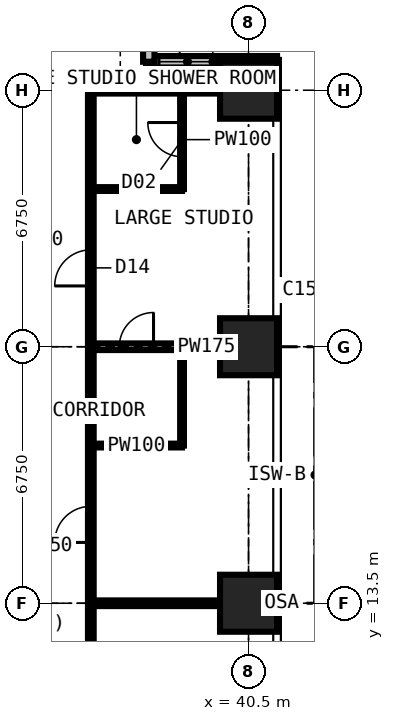
"""IFC4 building model, lengths in metres.
Left out: names, types, materials, properties, quantities, classifications, styles, units other than length and angle.
Written with IfcOpenShell. Run it as: python <this file> out.ifc"""

import sys

from ifc_helpers import new_model, si_unit, direction, frame, frame_2d, origin, origin_2d, place, context, subcontext, project, spatial, rectangle, extrude, element, fill, save


model = new_model("IFC4")
c1 = context("Model", 3, precision=1e-05, world=origin(), true_north=direction((0.0, 1.0)))
c2 = subcontext(c1, "Body", "Model", "MODEL_VIEW")
j1 = project(units=[si_unit("LENGTHUNIT", "METRE"), si_unit("PLANEANGLEUNIT", "RADIAN")], contexts=[c1])
p1 = place(None, origin())
s1 = spatial("IfcSite", under=j1, at=p1, CompositionType="ELEMENT")
p2 = place(p1, origin())
s2 = spatial("IfcBuilding", under=s1, at=p2, CompositionType="ELEMENT")
p3 = place(p2, frame((0.0, 0.0, 112.5)))
s3 = spatial("IfcBuildingStorey", under=s2, at=p3, CompositionType="ELEMENT", Elevation=112.5)
for number, where, z_axis, x_axis in (
    (1, (40.5, 13.5, 0.0), (0.0, 0.0, 1.0), (1.0, 0.0, 0.0)),
    (2, (40.5, 20.25, 0.0), (0.0, 0.0, 1.0), (1.0, 0.0, 0.0)),
    (3, (40.5, 27.0, 0.0), (0.0, 0.0, 1.0), (1.0, 0.0, 0.0)),
):
    element("IfcColumn", number, at=place(p3, frame(where, z_axis=z_axis, x_axis=x_axis)), inside=s3, PredefinedType="COLUMN", context=c2, shape_type="SweptSolid", body=[
        extrude(rectangle(XDim=1.5, YDim=1.5, at=origin_2d()), origin(), (0.0, 0.0, 1.0), 3.6),
    ])
p4 = place(p3, frame((41.25, 27.75, 0.0), z_axis=(0.0, 0.0, 1.0), x_axis=(-1.0, 0.0, 0.0)))
e4 = element("IfcWall", 4, at=p4, inside=s3, PredefinedType="SOLIDWALL", context=c2, shape_type="SweptSolid", body=[
    extrude(rectangle(XDim=3.375, YDim=0.3, at=frame_2d((1.688, 0.0))), origin(), (0.0, 0.0, 1.0), 3.375),
])
p5 = place(p4, frame((1.607, 0.0, 0.9)))
e5 = element("IfcOpeningElement", 5, at=p5, cuts=e4, PredefinedType="OPENING", context=c2, shape_type="SweptSolid", body=[
    extrude(rectangle(XDim=1.5, YDim=1.8, at=frame_2d((0.75, 0.9))), frame((0.0, 0.16, 0.0), z_axis=(0.0, -1.0, 0.0), x_axis=(1.0, 0.0, 0.0)), (0.0, 0.0, 1.0), 0.32),
])
p6 = place(p3, frame((37.875, 27.75, 0.0), z_axis=(0.0, 0.0, 1.0), x_axis=(0.0, 1.0, 0.0)))
e6 = element("IfcWall", 6, at=p6, inside=s3, PredefinedType="SOLIDWALL", context=c2, shape_type="SweptSolid", body=[
    extrude(rectangle(XDim=3.375, YDim=0.3, at=frame_2d((1.688, 0.0))), origin(), (0.0, 0.0, 1.0), 3.375),
])
p7 = place(p6, frame((0.788, 0.0, 0.6)))
e7 = element("IfcOpeningElement", 7, at=p7, cuts=e6, PredefinedType="OPENING", context=c2, shape_type="SweptSolid", body=[
    extrude(rectangle(XDim=1.8, YDim=2.1, at=frame_2d((0.9, 1.05))), frame((0.0, 0.16, 0.0), z_axis=(0.0, -1.0, 0.0), x_axis=(1.0, 0.0, 0.0)), (0.0, 0.0, 1.0), 0.32),
])
p8 = place(p3, frame((36.35, 6.75, 0.0), z_axis=(0.0, 0.0, 1.0), x_axis=(0.0, 1.0, 0.0)))
e8 = element("IfcWall", 8, at=p8, inside=s3, PredefinedType="PARTITIONING", context=c2, shape_type="SweptSolid", body=[
    extrude(rectangle(XDim=20.25, YDim=0.15, at=frame_2d((10.125, 0.0))), origin(), (0.0, 0.0, 1.0), 3.375),
])
p9 = place(p8, frame((15.1, 0.0, 0.0)))
e9 = element("IfcOpeningElement", 9, at=p9, cuts=e8, PredefinedType="OPENING", context=c2, shape_type="SweptSolid", body=[
    extrude(rectangle(XDim=0.95, YDim=2.2, at=frame_2d((0.475, 1.1))), frame((0.0, 0.085, 0.0), z_axis=(0.0, -1.0, 0.0), x_axis=(1.0, 0.0, 0.0)), (0.0, 0.0, 1.0), 0.17),
])
p10 = place(p8, frame((8.35, 0.0, 0.0)))
e10 = element("IfcOpeningElement", 10, at=p10, cuts=e8, PredefinedType="OPENING", context=c2, shape_type="SweptSolid", body=[
    extrude(rectangle(XDim=0.95, YDim=2.2, at=frame_2d((0.475, 1.1))), frame((0.0, 0.085, 0.0), z_axis=(0.0, -1.0, 0.0), x_axis=(1.0, 0.0, 0.0)), (0.0, 0.0, 1.0), 0.17),
])
p11 = place(p3, frame((36.35, 13.5, 0.0), z_axis=(0.0, 0.0, 1.0), x_axis=(1.0, 0.0, 0.0)))
e11 = element("IfcWall", 11, at=p11, inside=s3, PredefinedType="PARTITIONING", context=c2, shape_type="SweptSolid", body=[
    extrude(rectangle(XDim=4.884, YDim=0.15, at=frame_2d((2.442, 0.0))), origin(), (0.0, 0.0, 1.0), 2.61),
])
p12 = place(p3, frame((36.35, 17.65, 0.0), z_axis=(0.0, 0.0, 1.0), x_axis=(1.0, 0.0, 0.0)))
e12 = element("IfcWall", 12, at=p12, inside=s3, PredefinedType="PARTITIONING", context=c2, shape_type="SweptSolid", body=[
    extrude(rectangle(XDim=2.4, YDim=0.1, at=frame_2d((1.2, 0.0))), origin(), (0.0, 0.0, 1.0), 3.375),
])
p13 = place(p3, frame((36.35, 20.25, 0.0), z_axis=(0.0, 0.0, 1.0), x_axis=(1.0, 0.0, 0.0)))
e13 = element("IfcWall", 13, at=p13, inside=s3, PredefinedType="PARTITIONING", context=c2, shape_type="SweptSolid", body=[
    extrude(rectangle(XDim=4.884, YDim=0.175, at=frame_2d((2.442, 0.0))), origin(), (0.0, 0.0, 1.0), 2.61),
])
p14 = place(p13, frame((0.75, 0.0, 0.0)))
e14 = element("IfcOpeningElement", 14, at=p14, cuts=e13, PredefinedType="OPENING", context=c2, shape_type="SweptSolid", body=[
    extrude(rectangle(XDim=0.9, YDim=2.2, at=frame_2d((0.45, 1.1))), frame((0.0, 0.097, 0.0), z_axis=(0.0, -1.0, 0.0), x_axis=(1.0, 0.0, 0.0)), (0.0, 0.0, 1.0), 0.195),
])
p15 = place(p3, frame((36.35, 24.4, 0.0), z_axis=(0.0, 0.0, 1.0), x_axis=(1.0, 0.0, 0.0)))
e15 = element("IfcWall", 15, at=p15, inside=s3, PredefinedType="PARTITIONING", context=c2, shape_type="SweptSolid", body=[
    extrude(rectangle(XDim=2.4, YDim=0.1, at=frame_2d((1.2, 0.0))), origin(), (0.0, 0.0, 1.0), 3.375),
])
p16 = place(p3, frame((36.35, 27.0, 0.0), z_axis=(0.0, 0.0, 1.0), x_axis=(1.0, 0.0, 0.0)))
e16 = element("IfcWall", 16, at=p16, inside=s3, PredefinedType="PARTITIONING", context=c2, shape_type="SweptSolid", body=[
    extrude(rectangle(XDim=4.884, YDim=0.175, at=frame_2d((2.442, 0.0))), origin(), (0.0, 0.0, 1.0), 2.877),
])
p17 = place(p3, frame((37.875, 27.0, 0.0), z_axis=(0.0, 0.0, 1.0), x_axis=(0.0, 1.0, 0.0)))
e17 = element("IfcWall", 17, at=p17, inside=s3, PredefinedType="PARTITIONING", context=c2, shape_type="SweptSolid", body=[
    extrude(rectangle(XDim=0.734, YDim=0.15, at=frame_2d((0.367, 0.0))), origin(), (0.0, 0.0, 1.0), 3.375),
])
p18 = place(p3, frame((38.75, 17.65, 0.0), z_axis=(0.0, 0.0, 1.0), x_axis=(0.0, 1.0, 0.0)))
e18 = element("IfcWall", 18, at=p18, inside=s3, PredefinedType="PARTITIONING", context=c2, shape_type="SweptSolid", body=[
    extrude(rectangle(XDim=2.6, YDim=0.1, at=frame_2d((1.3, 0.0))), origin(), (0.0, 0.0, 1.0), 3.375),
])
p19 = place(p3, frame((38.75, 24.4, 0.0), z_axis=(0.0, 0.0, 1.0), x_axis=(0.0, 1.0, 0.0)))
e19 = element("IfcWall", 19, at=p19, inside=s3, PredefinedType="PARTITIONING", context=c2, shape_type="SweptSolid", body=[
    extrude(rectangle(XDim=2.6, YDim=0.1, at=frame_2d((1.3, 0.0))), origin(), (0.0, 0.0, 1.0), 3.375),
])
p20 = place(p19, frame((0.85, 0.0, 0.0)))
e20 = element("IfcOpeningElement", 20, at=p20, cuts=e19, PredefinedType="OPENING", context=c2, shape_type="SweptSolid", body=[
    extrude(rectangle(XDim=0.9, YDim=2.2, at=frame_2d((0.45, 1.1))), frame((0.0, 0.06, 0.0), z_axis=(0.0, -1.0, 0.0), x_axis=(1.0, 0.0, 0.0)), (0.0, 0.0, 1.0), 0.12),
])
p21 = place(p5, origin())
e21 = element("IfcWindow", 21, at=p21, inside=s3, PartitioningType="SINGLE_PANEL", PredefinedType="WINDOW", context=c2, shape_type="SweptSolid", body=[
    extrude(rectangle(XDim=1.5, YDim=1.8, at=frame_2d((0.75, 0.9))), frame((0.0, 0.03, 0.0), z_axis=(0.0, -1.0, 0.0), x_axis=(1.0, 0.0, 0.0)), (0.0, 0.0, 1.0), 0.06),
])
fill(e5, e21)
p22 = place(p9, origin())
e22 = element("IfcDoor", 22, at=p22, inside=s3, OperationType="SINGLE_SWING_LEFT", PredefinedType="DOOR", context=c2, shape_type="SweptSolid", body=[
    extrude(rectangle(XDim=0.95, YDim=2.2, at=frame_2d((0.475, 1.1))), frame((0.0, 0.025, 0.0), z_axis=(0.0, -1.0, 0.0), x_axis=(1.0, 0.0, 0.0)), (0.0, 0.0, 1.0), 0.05),
])
fill(e9, e22)
p23 = place(p20, origin())
e23 = element("IfcDoor", 23, at=p23, inside=s3, OperationType="SINGLE_SWING_RIGHT", PredefinedType="DOOR", context=c2, shape_type="SweptSolid", body=[
    extrude(rectangle(XDim=0.9, YDim=2.2, at=frame_2d((0.45, 1.1))), frame((0.0, 0.025, 0.0), z_axis=(0.0, -1.0, 0.0), x_axis=(1.0, 0.0, 0.0)), (0.0, 0.0, 1.0), 0.05),
])
fill(e20, e23)
p24 = place(p10, origin())
e24 = element("IfcDoor", 24, at=p24, inside=s3, OperationType="SINGLE_SWING_LEFT", PredefinedType="DOOR", context=c2, shape_type="SweptSolid", body=[
    extrude(rectangle(XDim=0.95, YDim=2.2, at=frame_2d((0.475, 1.1))), frame((0.0, 0.025, 0.0), z_axis=(0.0, -1.0, 0.0), x_axis=(1.0, 0.0, 0.0)), (0.0, 0.0, 1.0), 0.05),
])
fill(e10, e24)
p25 = place(p14, origin())
e25 = element("IfcDoor", 25, at=p25, inside=s3, OperationType="SINGLE_SWING_RIGHT", PredefinedType="DOOR", context=c2, shape_type="SweptSolid", body=[
    extrude(rectangle(XDim=0.9, YDim=2.2, at=frame_2d((0.45, 1.1))), frame((0.0, 0.025, 0.0), z_axis=(0.0, -1.0, 0.0), x_axis=(1.0, 0.0, 0.0)), (0.0, 0.0, 1.0), 0.05),
])
fill(e14, e25)
save(model, sys.argv[1])
